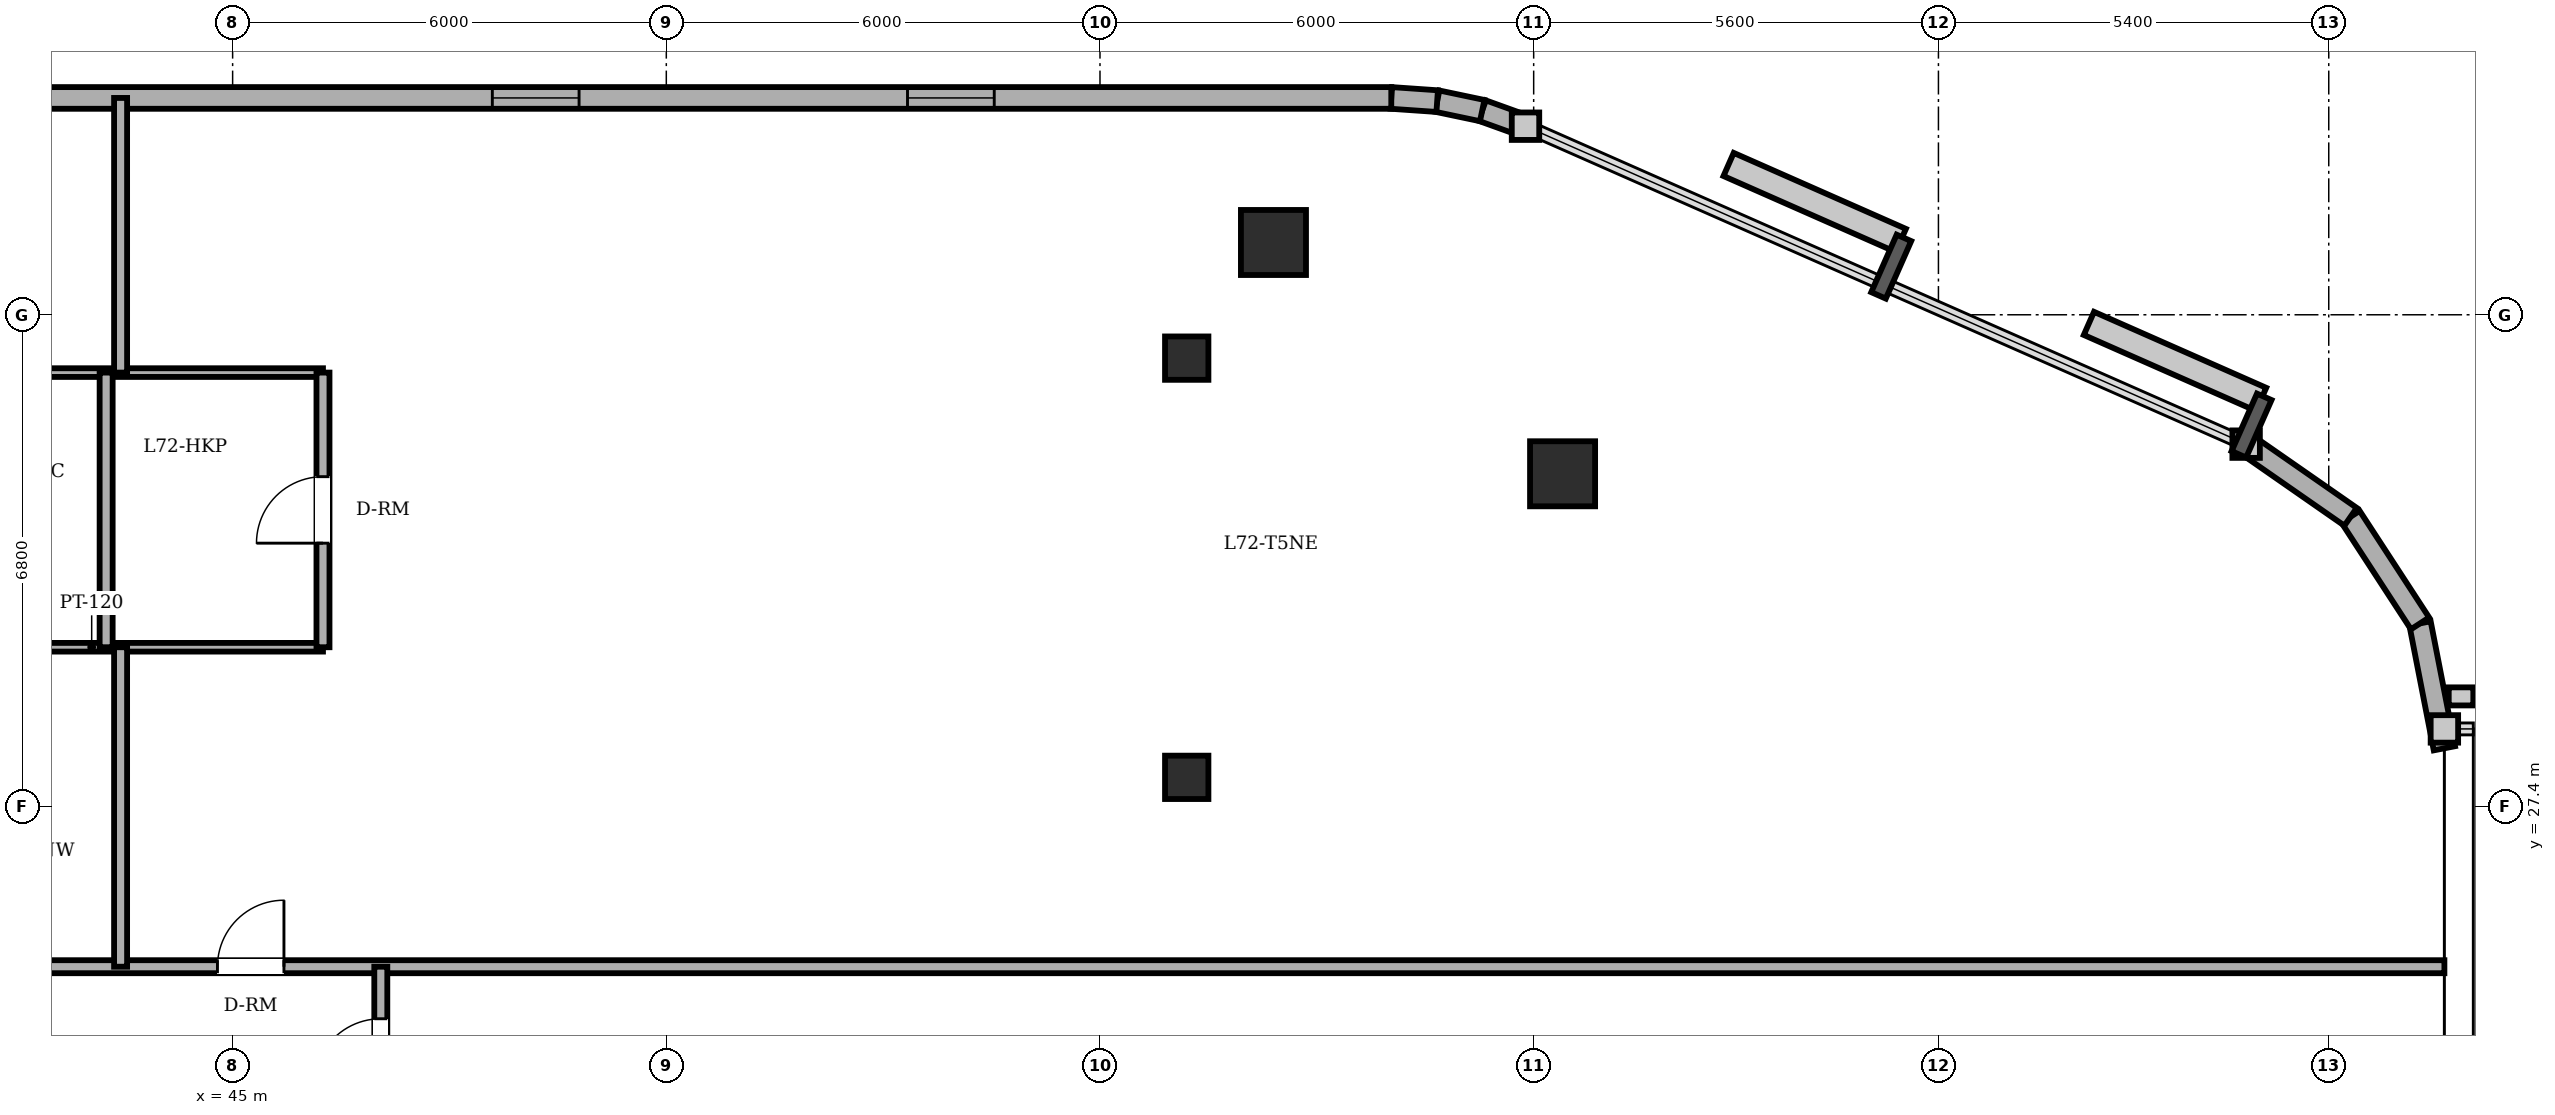
"""IFC4 building model, lengths in metres.
Left out: names, types, materials, properties, quantities, classifications, styles, units other than length and angle.
Written with IfcOpenShell. Run it as: python <this file> out.ifc"""

import sys

from ifc_helpers import new_model, si_unit, direction, frame, frame_2d, origin, origin_2d, place, context, subcontext, project, spatial, rectangle, circle, extrude, element, fill, save


model = new_model("IFC4")
c1 = context("Model", 3, precision=1e-05, world=origin(), true_north=direction((0.0, 1.0)))
c2 = subcontext(c1, "Body", "Model", "MODEL_VIEW")
j1 = project(units=[si_unit("LENGTHUNIT", "METRE"), si_unit("PLANEANGLEUNIT", "RADIAN")], contexts=[c1])
p1 = place(None, origin())
s1 = spatial("IfcSite", under=j1, at=p1, CompositionType="ELEMENT")
p2 = place(p1, origin())
s2 = spatial("IfcBuilding", under=s1, at=p2, CompositionType="ELEMENT")
p3 = place(p2, frame((0.0, 0.0, 277.05)))
s3 = spatial("IfcBuildingStorey", under=s2, at=p3, CompositionType="ELEMENT", Elevation=277.05)
for number, where, z_axis, x_axis in (
    (1, (63.4, 32.0, 0.0), (0.0, 0.0, 1.0), (1.0, 0.0, 0.0)),
    (2, (59.4, 35.2, 0.0), (0.0, 0.0, 1.0), (1.0, 0.0, 0.0)),
):
    element("IfcColumn", number, at=place(p3, frame(where, z_axis=z_axis, x_axis=x_axis)), inside=s3, PredefinedType="COLUMN", context=c2, shape_type="SweptSolid", body=[
        extrude(circle(Radius=0.45, at=origin_2d()), origin(), (0.0, 0.0, 1.0), 3.65),
    ])
for number, where, z_axis, x_axis in (
    (3, (58.2, 27.8, 0.0), (0.0, 0.0, 1.0), (1.0, 0.0, 0.0)),
    (4, (58.2, 33.6, 0.0), (0.0, 0.0, 1.0), (1.0, 0.0, 0.0)),
):
    element("IfcColumn", number, at=place(p3, frame(where, z_axis=z_axis, x_axis=x_axis)), inside=s3, PredefinedType="COLUMN", context=c2, shape_type="SweptSolid", body=[
        extrude(rectangle(XDim=0.6, YDim=0.6, at=origin_2d()), origin(), (0.0, 0.0, 1.0), 3.65),
    ])
for number, where, z_axis, x_axis in (
    (5, (75.6, 28.202, 0.0), (0.0, 0.0, 1.0), (-0.192, 0.981, 0.0)),
    (6, (75.263, 29.93, 0.0), (0.0, 0.0, 1.0), (-0.546, 0.838, 0.0)),
):
    element("IfcWall", number, at=place(p3, frame(where, z_axis=z_axis, x_axis=x_axis)), inside=s3, PredefinedType="SOLIDWALL", context=c2, shape_type="SweptSolid", body=[
        extrude(rectangle(XDim=1.76, YDim=0.3, at=frame_2d((0.88, 0.0))), origin(), (0.0, 0.0, 1.0), 3.45),
    ])
p4 = place(p3, frame((74.302, 31.405, 0.0), z_axis=(0.0, 0.0, 1.0), x_axis=(-0.821006966142, 0.570918174124, 0.0)))
e7 = element("IfcWall", 7, at=p4, inside=s3, PredefinedType="SOLIDWALL", context=c2, shape_type="SweptSolid", body=[
    extrude(rectangle(XDim=1.76, YDim=0.3, at=frame_2d((0.88, 0.0))), origin(), (0.0, 0.0, 1.0), 3.45),
])
p5 = place(p3, frame((62.887, 36.809, 0.0), z_axis=(0.0, 0.0, 1.0), x_axis=(-0.94077491148, 0.339031806665, 0.0)))
e8 = element("IfcWall", 8, at=p5, inside=s3, PredefinedType="SOLIDWALL", context=c2, shape_type="SweptSolid", body=[
    extrude(rectangle(XDim=0.636, YDim=0.3, at=frame_2d((0.318, 0.0))), origin(), (0.0, 0.0, 1.0), 3.45),
])
p6 = place(p3, frame((62.288, 37.025, 0.0), z_axis=(0.0, 0.0, 1.0), x_axis=(-0.97857012251, 0.205913854149, 0.0)))
e9 = element("IfcWall", 9, at=p6, inside=s3, PredefinedType="SOLIDWALL", context=c2, shape_type="SweptSolid", body=[
    extrude(rectangle(XDim=0.637, YDim=0.3, at=frame_2d((0.318, 0.0))), origin(), (0.0, 0.0, 1.0), 3.45),
])
p7 = place(p3, frame((61.665, 37.156, 0.0), z_axis=(0.0, 0.0, 1.0), x_axis=(-0.997613959688, 0.069039028352, 0.0)))
e10 = element("IfcWall", 10, at=p7, inside=s3, PredefinedType="SOLIDWALL", context=c2, shape_type="SweptSolid", body=[
    extrude(rectangle(XDim=0.636, YDim=0.3, at=frame_2d((0.318, 0.0))), origin(), (0.0, 0.0, 1.0), 3.45),
])
p8 = place(p3, frame((61.03, 37.2, 0.0), z_axis=(0.0, 0.0, 1.0), x_axis=(-1.0, 0.0, 0.0)))
e11 = element("IfcWall", 11, at=p8, inside=s3, PredefinedType="SOLIDWALL", context=c2, shape_type="SweptSolid", body=[
    extrude(rectangle(XDim=37.03, YDim=0.3, at=frame_2d((18.515, 0.0))), origin(), (0.0, 0.0, 1.0), 3.45),
])
p9 = place(p8, frame((25.205, 0.0, 0.0)))
e12 = element("IfcOpeningElement", 12, at=p9, cuts=e11, PredefinedType="OPENING", context=c2, shape_type="SweptSolid", body=[
    extrude(rectangle(XDim=0.95, YDim=2.2, at=frame_2d((0.475, 1.1))), frame((0.0, 0.16, 0.0), z_axis=(0.0, -1.0, 0.0), x_axis=(1.0, 0.0, 0.0)), (0.0, 0.0, 1.0), 0.32),
])
p10 = place(p8, frame((5.493, 0.0, 0.85)))
e13 = element("IfcOpeningElement", 13, at=p10, cuts=e11, PredefinedType="OPENING", context=c2, shape_type="SweptSolid", body=[
    extrude(rectangle(XDim=1.2, YDim=1.6, at=frame_2d((0.6, 0.8))), frame((0.0, 0.16, 0.0), z_axis=(0.0, -1.0, 0.0), x_axis=(1.0, 0.0, 0.0)), (0.0, 0.0, 1.0), 0.32),
])
p11 = place(p8, frame((11.237, 0.0, 0.85)))
e14 = element("IfcOpeningElement", 14, at=p11, cuts=e11, PredefinedType="OPENING", context=c2, shape_type="SweptSolid", body=[
    extrude(rectangle(XDim=1.2, YDim=1.6, at=frame_2d((0.6, 0.8))), frame((0.0, 0.16, 0.0), z_axis=(0.0, -1.0, 0.0), x_axis=(1.0, 0.0, 0.0)), (0.0, 0.0, 1.0), 0.32),
])
p12 = place(p8, frame((18.78, 0.0, 0.85)))
e15 = element("IfcOpeningElement", 15, at=p12, cuts=e11, PredefinedType="OPENING", context=c2, shape_type="SweptSolid", body=[
    extrude(rectangle(XDim=1.2, YDim=1.6, at=frame_2d((0.6, 0.8))), frame((0.0, 0.16, 0.0), z_axis=(0.0, -1.0, 0.0), x_axis=(1.0, 0.0, 0.0)), (0.0, 0.0, 1.0), 0.32),
])
p13 = place(p8, frame((30.913, 0.0, 0.85)))
e16 = element("IfcOpeningElement", 16, at=p13, cuts=e11, PredefinedType="OPENING", context=c2, shape_type="SweptSolid", body=[
    extrude(rectangle(XDim=1.2, YDim=1.6, at=frame_2d((0.6, 0.8))), frame((0.0, 0.16, 0.0), z_axis=(0.0, -1.0, 0.0), x_axis=(1.0, 0.0, 0.0)), (0.0, 0.0, 1.0), 0.32),
])
p14 = place(p3, frame((39.85, 25.18, 0.0), z_axis=(0.0, 0.0, 1.0), x_axis=(1.0, 0.0, 0.0)))
e17 = element("IfcWall", 17, at=p14, inside=s3, PredefinedType="PARTITIONING", context=c2, shape_type="SweptSolid", body=[
    extrude(rectangle(XDim=35.75, YDim=0.18, at=frame_2d((17.875, 0.0))), origin(), (0.0, 0.0, 1.0), 3.45),
])
p15 = place(p14, frame((4.94, 0.0, 0.0)))
e18 = element("IfcOpeningElement", 18, at=p15, cuts=e17, PredefinedType="OPENING", context=c2, shape_type="SweptSolid", body=[
    extrude(rectangle(XDim=0.92, YDim=2.1, at=frame_2d((0.46, 1.05))), frame((0.0, 0.1, 0.0), z_axis=(0.0, -1.0, 0.0), x_axis=(1.0, 0.0, 0.0)), (0.0, 0.0, 1.0), 0.2),
])
p16 = place(p3, frame((39.85, 29.6, 0.0), z_axis=(0.0, 0.0, 1.0), x_axis=(1.0, 0.0, 0.0)))
e19 = element("IfcWall", 19, at=p16, inside=s3, PredefinedType="PARTITIONING", context=c2, shape_type="SweptSolid", body=[
    extrude(rectangle(XDim=6.4, YDim=0.12, at=frame_2d((3.2, 0.0))), origin(), (0.0, 0.0, 1.0), 3.132),
])
p17 = place(p3, frame((39.85, 33.4, 0.0), z_axis=(0.0, 0.0, 1.0), x_axis=(1.0, 0.0, 0.0)))
e20 = element("IfcWall", 20, at=p17, inside=s3, PredefinedType="PARTITIONING", context=c2, shape_type="SweptSolid", body=[
    extrude(rectangle(XDim=6.4, YDim=0.12, at=frame_2d((3.2, 0.0))), origin(), (0.0, 0.0, 1.0), 3.092),
])
p18 = place(p3, frame((43.25, 29.6, 0.0), z_axis=(0.0, 0.0, 1.0), x_axis=(0.0, 1.0, 0.0)))
e21 = element("IfcWall", 21, at=p18, inside=s3, PredefinedType="PARTITIONING", context=c2, shape_type="SweptSolid", body=[
    extrude(rectangle(XDim=3.8, YDim=0.18, at=frame_2d((1.9, 0.0))), origin(), (0.0, 0.0, 1.0), 3.45),
])
p19 = place(p3, frame((43.45, 25.18, 0.0), z_axis=(0.0, 0.0, 1.0), x_axis=(0.0, 1.0, 0.0)))
e22 = element("IfcWall", 22, at=p19, inside=s3, PredefinedType="PARTITIONING", context=c2, shape_type="SweptSolid", body=[
    extrude(rectangle(XDim=4.42, YDim=0.18, at=frame_2d((2.21, 0.0))), origin(), (0.0, 0.0, 1.0), 3.45),
])
p20 = place(p3, frame((43.45, 33.4, 0.0), z_axis=(0.0, 0.0, 1.0), x_axis=(0.0, 1.0, 0.0)))
e23 = element("IfcWall", 23, at=p20, inside=s3, PredefinedType="PARTITIONING", context=c2, shape_type="SweptSolid", body=[
    extrude(rectangle(XDim=3.8, YDim=0.18, at=frame_2d((1.9, 0.0))), origin(), (0.0, 0.0, 1.0), 3.45),
])
p21 = place(p3, frame((46.25, 29.6, 0.0), z_axis=(0.0, 0.0, 1.0), x_axis=(0.0, 1.0, 0.0)))
e24 = element("IfcWall", 24, at=p21, inside=s3, PredefinedType="PARTITIONING", context=c2, shape_type="SweptSolid", body=[
    extrude(rectangle(XDim=3.8, YDim=0.18, at=frame_2d((1.9, 0.0))), origin(), (0.0, 0.0, 1.0), 3.45),
])
p22 = place(p21, frame((1.44, 0.0, 0.0)))
e25 = element("IfcOpeningElement", 25, at=p22, cuts=e24, PredefinedType="OPENING", context=c2, shape_type="SweptSolid", body=[
    extrude(rectangle(XDim=0.92, YDim=2.1, at=frame_2d((0.46, 1.05))), frame((0.0, 0.1, 0.0), z_axis=(0.0, -1.0, 0.0), x_axis=(1.0, 0.0, 0.0)), (0.0, 0.0, 1.0), 0.2),
])
p23 = place(p3, frame((47.05, 22.82, 0.0), z_axis=(0.0, 0.0, 1.0), x_axis=(0.0, 1.0, 0.0)))
e26 = element("IfcWall", 26, at=p23, inside=s3, PredefinedType="PARTITIONING", context=c2, shape_type="SweptSolid", body=[
    extrude(rectangle(XDim=2.36, YDim=0.18, at=frame_2d((1.18, 0.0))), origin(), (0.0, 0.0, 1.0), 3.45),
])
p24 = place(p23, frame((0.72, 0.0, 0.0)))
e27 = element("IfcOpeningElement", 27, at=p24, cuts=e26, PredefinedType="OPENING", context=c2, shape_type="SweptSolid", body=[
    extrude(rectangle(XDim=0.92, YDim=2.1, at=frame_2d((0.46, 1.05))), frame((0.0, 0.1, 0.0), z_axis=(0.0, -1.0, 0.0), x_axis=(1.0, 0.0, 0.0)), (0.0, 0.0, 1.0), 0.2),
])
p25 = place(p10, origin())
e28 = element("IfcWindow", 28, at=p25, inside=s3, PartitioningType="SINGLE_PANEL", PredefinedType="WINDOW", context=c2, shape_type="SweptSolid", body=[
    extrude(rectangle(XDim=1.2, YDim=1.6, at=frame_2d((0.6, 0.8))), frame((0.0, 0.03, 0.0), z_axis=(0.0, -1.0, 0.0), x_axis=(1.0, 0.0, 0.0)), (0.0, 0.0, 1.0), 0.06),
])
fill(e13, e28)
p26 = place(p11, origin())
e29 = element("IfcWindow", 29, at=p26, inside=s3, PartitioningType="SINGLE_PANEL", PredefinedType="WINDOW", context=c2, shape_type="SweptSolid", body=[
    extrude(rectangle(XDim=1.2, YDim=1.6, at=frame_2d((0.6, 0.8))), frame((0.0, 0.03, 0.0), z_axis=(0.0, -1.0, 0.0), x_axis=(1.0, 0.0, 0.0)), (0.0, 0.0, 1.0), 0.06),
])
fill(e14, e29)
p27 = place(p15, origin())
e30 = element("IfcDoor", 30, at=p27, inside=s3, OperationType="SINGLE_SWING_RIGHT", PredefinedType="DOOR", context=c2, shape_type="SweptSolid", body=[
    extrude(rectangle(XDim=0.92, YDim=2.1, at=frame_2d((0.46, 1.05))), frame((0.0, 0.025, 0.0), z_axis=(0.0, -1.0, 0.0), x_axis=(1.0, 0.0, 0.0)), (0.0, 0.0, 1.0), 0.05),
])
fill(e18, e30)
p28 = place(p24, origin())
e31 = element("IfcDoor", 31, at=p28, inside=s3, OperationType="SINGLE_SWING_LEFT", PredefinedType="DOOR", context=c2, shape_type="SweptSolid", body=[
    extrude(rectangle(XDim=0.92, YDim=2.1, at=frame_2d((0.46, 1.05))), frame((0.0, 0.025, 0.0), z_axis=(0.0, -1.0, 0.0), x_axis=(1.0, 0.0, 0.0)), (0.0, 0.0, 1.0), 0.05),
])
fill(e27, e31)
p29 = place(p22, origin())
e32 = element("IfcDoor", 32, at=p29, inside=s3, OperationType="SINGLE_SWING_LEFT", PredefinedType="DOOR", context=c2, shape_type="SweptSolid", body=[
    extrude(rectangle(XDim=0.92, YDim=2.1, at=frame_2d((0.46, 1.05))), frame((0.0, 0.025, 0.0), z_axis=(0.0, -1.0, 0.0), x_axis=(1.0, 0.0, 0.0)), (0.0, 0.0, 1.0), 0.05),
])
fill(e25, e32)
save(model, sys.argv[1])
